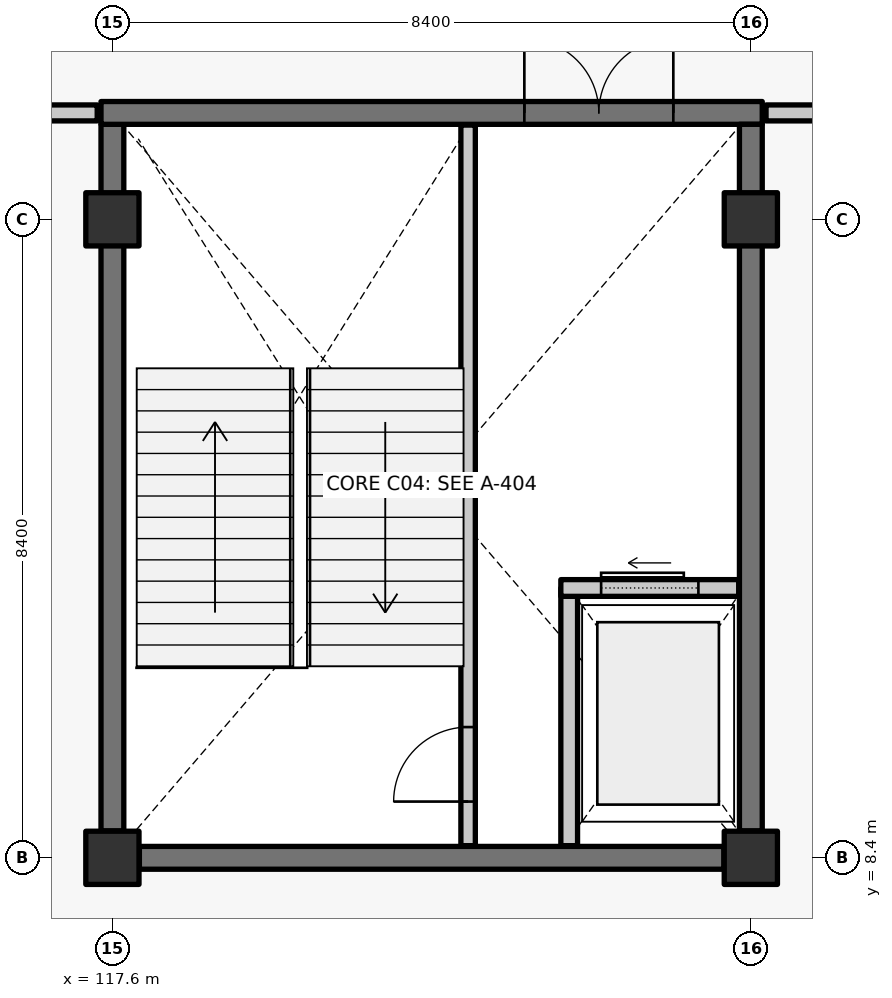
"""IFC4 building model, lengths in metres.
Left out: names, types, materials, properties, quantities, classifications, styles, units other than length and angle.
Written with IfcOpenShell. Run it as: python <this file> out.ifc"""

import sys

from ifc_helpers import new_model, si_unit, direction, frame, frame_2d, origin, origin_2d, place, context, subcontext, project, spatial, rectangle, extrude, element, fill, save


model = new_model("IFC4")
c1 = context("Model", 3, precision=1e-05, world=origin(), true_north=direction((0.0, 1.0)))
c2 = subcontext(c1, "Body", "Model", "MODEL_VIEW")
j1 = project(units=[si_unit("LENGTHUNIT", "METRE"), si_unit("PLANEANGLEUNIT", "RADIAN")], contexts=[c1])
p1 = place(None, origin())
s1 = spatial("IfcSite", under=j1, at=p1, CompositionType="ELEMENT")
p2 = place(p1, origin())
s2 = spatial("IfcBuilding", under=s1, at=p2, CompositionType="ELEMENT")
p3 = place(p2, frame((0.0, 0.0, 11.4)))
s3 = spatial("IfcBuildingStorey", under=s2, at=p3, CompositionType="ELEMENT", Elevation=11.4)
for number, where, z_axis, x_axis in (
    (1, (117.6, 8.4, 0.0), (0.0, 0.0, 1.0), (1.0, 0.0, 0.0)),
    (2, (117.6, 16.8, 0.0), (0.0, 0.0, 1.0), (1.0, 0.0, 0.0)),
    (3, (126.0, 8.4, 0.0), (0.0, 0.0, 1.0), (1.0, 0.0, 0.0)),
    (4, (126.0, 16.8, 0.0), (0.0, 0.0, 1.0), (1.0, 0.0, 0.0)),
):
    element("IfcColumn", number, at=place(p3, frame(where, z_axis=z_axis, x_axis=x_axis)), inside=s3, PredefinedType="COLUMN", context=c2, shape_type="SweptSolid", body=[
        extrude(rectangle(XDim=0.7, YDim=0.7, at=origin_2d()), origin(), (0.0, 0.0, 1.0), 4.8),
    ])
p4 = place(p3, frame((125.645, 8.4, 0.0), z_axis=(0.0, 0.0, 1.0), x_axis=(-1.0, 0.0, 0.0)))
e5 = element("IfcWall", 5, at=p4, inside=s3, PredefinedType="SHEAR", context=c2, shape_type="SweptSolid", body=[
    extrude(rectangle(XDim=7.69, YDim=0.3, at=frame_2d((3.845, 0.0))), origin(), (0.0, 0.0, 1.0), 4.52),
])
p5 = place(p3, frame((117.6, 8.755, 0.0), z_axis=(0.0, 0.0, 1.0), x_axis=(0.0, 1.0, 0.0)))
e6 = element("IfcWall", 6, at=p5, inside=s3, PredefinedType="SHEAR", context=c2, shape_type="SweptSolid", body=[
    extrude(rectangle(XDim=9.295, YDim=0.3, at=frame_2d((4.647, 0.0))), origin(), (0.0, 0.0, 1.0), 4.52),
])
p6 = place(p3, frame((117.45, 18.2, 0.0), z_axis=(0.0, 0.0, 1.0), x_axis=(1.0, 0.0, 0.0)))
e7 = element("IfcWall", 7, at=p6, inside=s3, PredefinedType="SHEAR", context=c2, shape_type="SweptSolid", body=[
    extrude(rectangle(XDim=8.7, YDim=0.3, at=frame_2d((4.35, 0.0))), origin(), (0.0, 0.0, 1.0), 4.52),
])
p7 = place(p6, frame((5.57, 0.0, 0.0)))
e8 = element("IfcOpeningElement", 8, at=p7, cuts=e7, PredefinedType="OPENING", context=c2, shape_type="SweptSolid", body=[
    extrude(rectangle(XDim=1.96, YDim=2.2, at=frame_2d((0.98, 1.1))), frame((0.0, 0.16, 0.0), z_axis=(0.0, -1.0, 0.0), x_axis=(1.0, 0.0, 0.0)), (0.0, 0.0, 1.0), 0.32),
])
p8 = place(p3, frame((126.0, 18.05, 0.0), z_axis=(0.0, 0.0, 1.0), x_axis=(0.0, -1.0, 0.0)))
e9 = element("IfcWall", 9, at=p8, inside=s3, PredefinedType="SHEAR", context=c2, shape_type="SweptSolid", body=[
    extrude(rectangle(XDim=9.295, YDim=0.3, at=frame_2d((4.647, 0.0))), origin(), (0.0, 0.0, 1.0), 4.52),
])
p9 = place(p3, frame((122.28, 8.56, 0.0), z_axis=(0.0, 0.0, 1.0), x_axis=(0.0, 1.0, 0.0)))
e10 = element("IfcWall", 10, at=p9, inside=s3, PredefinedType="SOLIDWALL", context=c2, shape_type="SweptSolid", body=[
    extrude(rectangle(XDim=9.48, YDim=0.19, at=frame_2d((4.74, 0.0))), origin(), (0.0, 0.0, 1.0), 4.52),
])
p10 = place(p9, frame((0.58, 0.0, 0.0)))
e11 = element("IfcOpeningElement", 11, at=p10, cuts=e10, PredefinedType="OPENING", context=c2, shape_type="SweptSolid", body=[
    extrude(rectangle(XDim=0.98, YDim=2.15, at=frame_2d((0.49, 1.075))), frame((0.0, 0.105, 0.0), z_axis=(0.0, -1.0, 0.0), x_axis=(1.0, 0.0, 0.0)), (0.0, 0.0, 1.0), 0.21),
])
p11 = place(p3, frame((123.61, 8.56, 0.0), z_axis=(0.0, 0.0, 1.0), x_axis=(0.0, 1.0, 0.0)))
e12 = element("IfcWall", 12, at=p11, inside=s3, PredefinedType="SOLIDWALL", context=c2, shape_type="SweptSolid", body=[
    extrude(rectangle(XDim=3.39, YDim=0.22, at=frame_2d((1.695, 0.0))), origin(), (0.0, 0.0, 1.0), 4.52),
])
p12 = place(p3, frame((123.5, 11.95, 0.0), z_axis=(0.0, 0.0, 1.0), x_axis=(1.0, 0.0, 0.0)))
e13 = element("IfcWall", 13, at=p12, inside=s3, PredefinedType="SOLIDWALL", context=c2, shape_type="SweptSolid", body=[
    extrude(rectangle(XDim=2.34, YDim=0.22, at=frame_2d((1.17, 0.0))), origin(), (0.0, 0.0, 1.0), 4.52),
])
p13 = place(p12, frame((0.53, 0.0, 0.0)))
e14 = element("IfcOpeningElement", 14, at=p13, cuts=e13, PredefinedType="OPENING", context=c2, shape_type="SweptSolid", body=[
    extrude(rectangle(XDim=1.28, YDim=2.25, at=frame_2d((0.64, 1.125))), frame((0.0, 0.12, 0.0), z_axis=(0.0, -1.0, 0.0), x_axis=(1.0, 0.0, 0.0)), (0.0, 0.0, 1.0), 0.24),
])
p14 = place(p3, frame((101.0, 18.2, 0.0), z_axis=(0.0, 0.0, 1.0), x_axis=(1.0, 0.0, 0.0)))
e15 = element("IfcWall", 15, at=p14, inside=s3, PredefinedType="PARTITIONING", context=c2, shape_type="SweptSolid", body=[
    extrude(rectangle(XDim=16.4, YDim=0.21, at=frame_2d((8.2, 0.0))), origin(), (0.0, 0.0, 1.0), 4.52),
])
p15 = place(p14, frame((3.5, 0.0, 0.0)))
e16 = element("IfcOpeningElement", 16, at=p15, cuts=e15, PredefinedType="OPENING", context=c2, shape_type="SweptSolid", body=[
    extrude(rectangle(XDim=1.0, YDim=2.15, at=frame_2d((0.5, 1.075))), frame((0.0, 0.115, 0.0), z_axis=(0.0, -1.0, 0.0), x_axis=(1.0, 0.0, 0.0)), (0.0, 0.0, 1.0), 0.23),
])
p16 = place(p14, frame((11.9, 0.0, 0.0)))
e17 = element("IfcOpeningElement", 17, at=p16, cuts=e15, PredefinedType="OPENING", context=c2, shape_type="SweptSolid", body=[
    extrude(rectangle(XDim=1.0, YDim=2.15, at=frame_2d((0.5, 1.075))), frame((0.0, 0.115, 0.0), z_axis=(0.0, -1.0, 0.0), x_axis=(1.0, 0.0, 0.0)), (0.0, 0.0, 1.0), 0.23),
])
p17 = place(p3, frame((126.2, 18.2, 0.0), z_axis=(0.0, 0.0, 1.0), x_axis=(1.0, 0.0, 0.0)))
e18 = element("IfcWall", 18, at=p17, inside=s3, PredefinedType="PARTITIONING", context=c2, shape_type="SweptSolid", body=[
    extrude(rectangle(XDim=16.4, YDim=0.21, at=frame_2d((8.2, 0.0))), origin(), (0.0, 0.0, 1.0), 4.55),
])
p18 = place(p17, frame((3.5, 0.0, 0.0)))
e19 = element("IfcOpeningElement", 19, at=p18, cuts=e18, PredefinedType="OPENING", context=c2, shape_type="SweptSolid", body=[
    extrude(rectangle(XDim=1.0, YDim=2.15, at=frame_2d((0.5, 1.075))), frame((0.0, 0.115, 0.0), z_axis=(0.0, -1.0, 0.0), x_axis=(1.0, 0.0, 0.0)), (0.0, 0.0, 1.0), 0.23),
])
p19 = place(p17, frame((11.9, 0.0, 0.0)))
e20 = element("IfcOpeningElement", 20, at=p19, cuts=e18, PredefinedType="OPENING", context=c2, shape_type="SweptSolid", body=[
    extrude(rectangle(XDim=1.0, YDim=2.15, at=frame_2d((0.5, 1.075))), frame((0.0, 0.115, 0.0), z_axis=(0.0, -1.0, 0.0), x_axis=(1.0, 0.0, 0.0)), (0.0, 0.0, 1.0), 0.23),
])
p20 = place(p10, origin())
e21 = element("IfcDoor", 21, at=p20, inside=s3, OperationType="SINGLE_SWING_LEFT", PredefinedType="DOOR", context=c2, shape_type="SweptSolid", body=[
    extrude(rectangle(XDim=0.98, YDim=2.15, at=frame_2d((0.49, 1.075))), frame((0.0, 0.025, 0.0), z_axis=(0.0, -1.0, 0.0), x_axis=(1.0, 0.0, 0.0)), (0.0, 0.0, 1.0), 0.05),
])
fill(e11, e21)
p21 = place(p7, origin())
e22 = element("IfcDoor", 22, at=p21, inside=s3, OperationType="DOUBLE_DOOR_SINGLE_SWING", PredefinedType="DOOR", context=c2, shape_type="SweptSolid", body=[
    extrude(rectangle(XDim=1.96, YDim=2.2, at=frame_2d((0.98, 1.1))), frame((0.0, 0.025, 0.0), z_axis=(0.0, -1.0, 0.0), x_axis=(1.0, 0.0, 0.0)), (0.0, 0.0, 1.0), 0.05),
])
fill(e8, e22)
p22 = place(p13, origin())
e23 = element("IfcDoor", 23, at=p22, inside=s3, OperationType="SLIDING_TO_LEFT", PredefinedType="DOOR", context=c2, shape_type="SweptSolid", body=[
    extrude(rectangle(XDim=1.28, YDim=2.25, at=frame_2d((0.64, 1.125))), frame((0.0, 0.025, 0.0), z_axis=(0.0, -1.0, 0.0), x_axis=(1.0, 0.0, 0.0)), (0.0, 0.0, 1.0), 0.05),
])
fill(e14, e23)
save(model, sys.argv[1])
